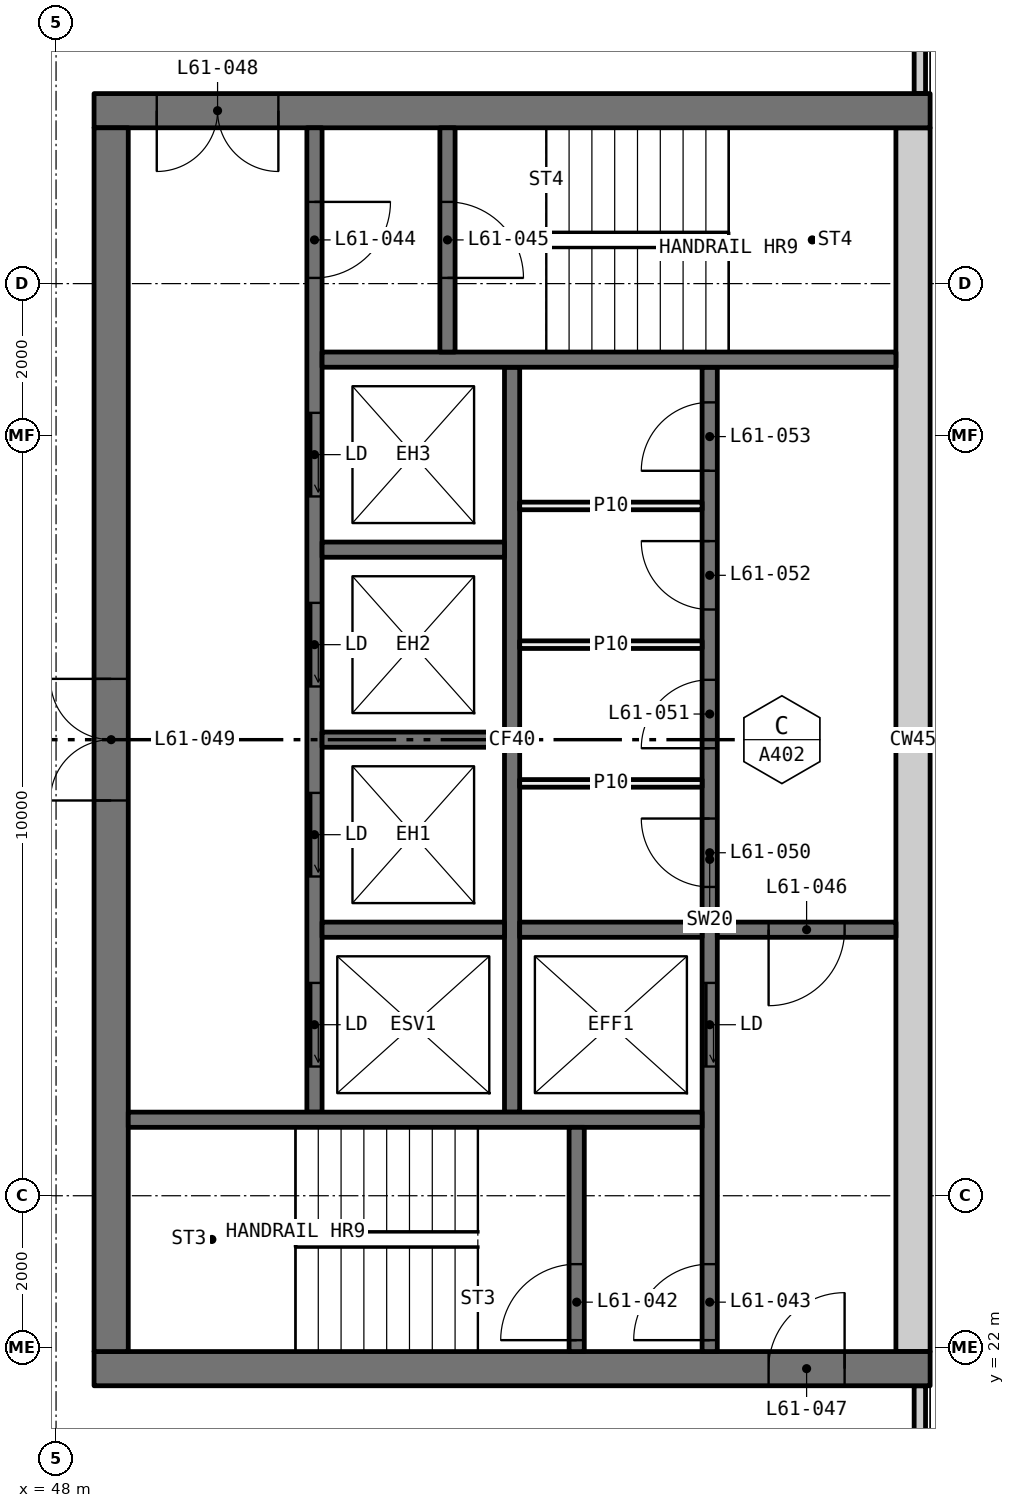
"""IFC4 building model, lengths in metres.
Left out: names, types, materials, properties, quantities, classifications, styles, units other than length and angle.
Written with IfcOpenShell. Run it as: python <this file> out.ifc"""

import sys

from ifc_helpers import new_model, si_unit, direction, frame, frame_2d, origin, place, context, subcontext, project, spatial, rectangle, extrude, element, fill, save


model = new_model("IFC4")
c1 = context("Model", 3, precision=1e-05, world=origin(), true_north=direction((0.0, 1.0)))
c2 = subcontext(c1, "Body", "Model", "MODEL_VIEW")
j1 = project(units=[si_unit("LENGTHUNIT", "METRE"), si_unit("PLANEANGLEUNIT", "RADIAN")], contexts=[c1])
p1 = place(None, origin())
s1 = spatial("IfcSite", under=j1, at=p1, CompositionType="ELEMENT")
p2 = place(p1, origin())
s2 = spatial("IfcBuilding", under=s1, at=p2, CompositionType="ELEMENT")
p3 = place(p2, frame((0.0, 0.0, 228.3)))
s3 = spatial("IfcBuildingStorey", under=s2, at=p3, CompositionType="ELEMENT", Elevation=228.3)
for number, where, z_axis, x_axis in (
    (1, (59.365, 18.71, 0.0), (0.0, 0.0, 1.0), (0.0, 1.0, 0.0)),
    (2, (59.365, 38.5, 0.0), (0.0, 0.0, 1.0), (0.0, 1.0, 0.0)),
):
    element("IfcWall", number, at=place(p3, frame(where, z_axis=z_axis, x_axis=x_axis)), inside=s3, PredefinedType="ELEMENTEDWALL", context=c2, shape_type="SweptSolid", body=[
        extrude(rectangle(XDim=2.79, YDim=0.15, at=frame_2d((1.395, 0.0))), origin(), (0.0, 0.0, 1.0), 3.05),
    ])
p4 = place(p3, frame((59.5, 21.725, 0.0), z_axis=(0.0, 0.0, 1.0), x_axis=(-1.0, 0.0, 0.0)))
e3 = element("IfcWall", 3, at=p4, inside=s3, PredefinedType="SHEAR", context=c2, shape_type="SweptSolid", body=[
    extrude(rectangle(XDim=11.0, YDim=0.45, at=frame_2d((5.5, 0.0))), origin(), (0.0, 0.0, 1.0), 3.05),
])
p5 = place(p4, frame((1.125, 0.0, 0.0)))
e4 = element("IfcOpeningElement", 4, at=p5, cuts=e3, PredefinedType="OPENING", context=c2, shape_type="SweptSolid", body=[
    extrude(rectangle(XDim=1.0, YDim=2.1, at=frame_2d((0.5, 1.05))), frame((0.0, 0.235, 0.0), z_axis=(0.0, -1.0, 0.0), x_axis=(1.0, 0.0, 0.0)), (0.0, 0.0, 1.0), 0.47),
])
p6 = place(p3, frame((59.5, 38.275, 0.0), z_axis=(0.0, 0.0, 1.0), x_axis=(-1.0, 0.0, 0.0)))
e5 = element("IfcWall", 5, at=p6, inside=s3, PredefinedType="SHEAR", context=c2, shape_type="SweptSolid", body=[
    extrude(rectangle(XDim=11.0, YDim=0.45, at=frame_2d((5.5, 0.0))), origin(), (0.0, 0.0, 1.0), 3.05),
])
p7 = place(p6, frame((8.575, 0.0, 0.0)))
e6 = element("IfcOpeningElement", 6, at=p7, cuts=e5, PredefinedType="OPENING", context=c2, shape_type="SweptSolid", body=[
    extrude(rectangle(XDim=1.6, YDim=2.1, at=frame_2d((0.8, 1.05))), frame((0.0, 0.235, 0.0), z_axis=(0.0, -1.0, 0.0), x_axis=(1.0, 0.0, 0.0)), (0.0, 0.0, 1.0), 0.47),
])
p8 = place(p3, frame((59.275, 21.95, 0.0), z_axis=(0.0, 0.0, 1.0), x_axis=(0.0, 1.0, 0.0)))
e7 = element("IfcWall", 7, at=p8, inside=s3, PredefinedType="SHEAR", context=c2, shape_type="SweptSolid", body=[
    extrude(rectangle(XDim=16.1, YDim=0.45, at=frame_2d((8.05, 0.0))), origin(), (0.0, 0.0, 1.0), 3.05),
])
p9 = place(p3, frame((48.725, 21.95, 0.0), z_axis=(0.0, 0.0, 1.0), x_axis=(0.0, 1.0, 0.0)))
e8 = element("IfcWall", 8, at=p9, inside=s3, PredefinedType="SHEAR", context=c2, shape_type="SweptSolid", body=[
    extrude(rectangle(XDim=16.1, YDim=0.45, at=frame_2d((8.05, 0.0))), origin(), (0.0, 0.0, 1.0), 3.05),
])
p10 = place(p9, frame((7.25, 0.0, 0.0)))
e9 = element("IfcOpeningElement", 9, at=p10, cuts=e8, PredefinedType="OPENING", context=c2, shape_type="SweptSolid", body=[
    extrude(rectangle(XDim=1.6, YDim=2.1, at=frame_2d((0.8, 1.05))), frame((0.0, 0.235, 0.0), z_axis=(0.0, -1.0, 0.0), x_axis=(1.0, 0.0, 0.0)), (0.0, 0.0, 1.0), 0.47),
])
p11 = place(p3, frame((56.6, 21.95, 0.0), z_axis=(0.0, 0.0, 1.0), x_axis=(0.0, 1.0, 0.0)))
e10 = element("IfcWall", 10, at=p11, inside=s3, PredefinedType="SOLIDWALL", context=c2, shape_type="SweptSolid", body=[
    extrude(rectangle(XDim=12.95, YDim=0.2, at=frame_2d((6.475, 0.0))), origin(), (0.0, 0.0, 1.0), 3.05),
])
p12 = place(p11, frame((3.75, 0.0, 0.0)))
e11 = element("IfcOpeningElement", 11, at=p12, cuts=e10, PredefinedType="OPENING", context=c2, shape_type="SweptSolid", body=[
    extrude(rectangle(XDim=1.1, YDim=2.1, at=frame_2d((0.55, 1.05))), frame((0.0, 0.11, 0.0), z_axis=(0.0, -1.0, 0.0), x_axis=(1.0, 0.0, 0.0)), (0.0, 0.0, 1.0), 0.22),
])
p13 = place(p11, frame((0.15, 0.0, 0.0)))
e12 = element("IfcOpeningElement", 12, at=p13, cuts=e10, PredefinedType="OPENING", context=c2, shape_type="SweptSolid", body=[
    extrude(rectangle(XDim=1.0, YDim=2.1, at=frame_2d((0.5, 1.05))), frame((0.0, 0.11, 0.0), z_axis=(0.0, -1.0, 0.0), x_axis=(1.0, 0.0, 0.0)), (0.0, 0.0, 1.0), 0.22),
])
p14 = place(p11, frame((6.113, 0.0, 0.0)))
e13 = element("IfcOpeningElement", 13, at=p14, cuts=e10, PredefinedType="OPENING", context=c2, shape_type="SweptSolid", body=[
    extrude(rectangle(XDim=0.9, YDim=2.1, at=frame_2d((0.45, 1.05))), frame((0.0, 0.11, 0.0), z_axis=(0.0, -1.0, 0.0), x_axis=(1.0, 0.0, 0.0)), (0.0, 0.0, 1.0), 0.22),
])
p15 = place(p11, frame((7.938, 0.0, 0.0)))
e14 = element("IfcOpeningElement", 14, at=p15, cuts=e10, PredefinedType="OPENING", context=c2, shape_type="SweptSolid", body=[
    extrude(rectangle(XDim=0.9, YDim=2.1, at=frame_2d((0.45, 1.05))), frame((0.0, 0.11, 0.0), z_axis=(0.0, -1.0, 0.0), x_axis=(1.0, 0.0, 0.0)), (0.0, 0.0, 1.0), 0.22),
])
p16 = place(p11, frame((9.762, 0.0, 0.0)))
e15 = element("IfcOpeningElement", 15, at=p16, cuts=e10, PredefinedType="OPENING", context=c2, shape_type="SweptSolid", body=[
    extrude(rectangle(XDim=0.9, YDim=2.1, at=frame_2d((0.45, 1.05))), frame((0.0, 0.11, 0.0), z_axis=(0.0, -1.0, 0.0), x_axis=(1.0, 0.0, 0.0)), (0.0, 0.0, 1.0), 0.22),
])
p17 = place(p11, frame((11.587, 0.0, 0.0)))
e16 = element("IfcOpeningElement", 16, at=p17, cuts=e10, PredefinedType="OPENING", context=c2, shape_type="SweptSolid", body=[
    extrude(rectangle(XDim=0.9, YDim=2.1, at=frame_2d((0.45, 1.05))), frame((0.0, 0.11, 0.0), z_axis=(0.0, -1.0, 0.0), x_axis=(1.0, 0.0, 0.0)), (0.0, 0.0, 1.0), 0.22),
])
p18 = place(p3, frame((51.4, 25.1, 0.0), z_axis=(0.0, 0.0, 1.0), x_axis=(0.0, 1.0, 0.0)))
e17 = element("IfcWall", 17, at=p18, inside=s3, PredefinedType="SOLIDWALL", context=c2, shape_type="SweptSolid", body=[
    extrude(rectangle(XDim=12.95, YDim=0.2, at=frame_2d((6.475, 0.0))), origin(), (0.0, 0.0, 1.0), 3.05),
])
p19 = place(p18, frame((0.6, 0.0, 0.0)))
e18 = element("IfcOpeningElement", 18, at=p19, cuts=e17, PredefinedType="OPENING", context=c2, shape_type="SweptSolid", body=[
    extrude(rectangle(XDim=1.1, YDim=2.1, at=frame_2d((0.55, 1.05))), frame((0.0, 0.11, 0.0), z_axis=(0.0, -1.0, 0.0), x_axis=(1.0, 0.0, 0.0)), (0.0, 0.0, 1.0), 0.22),
])
p20 = place(p18, frame((3.1, 0.0, 0.0)))
e19 = element("IfcOpeningElement", 19, at=p20, cuts=e17, PredefinedType="OPENING", context=c2, shape_type="SweptSolid", body=[
    extrude(rectangle(XDim=1.1, YDim=2.1, at=frame_2d((0.55, 1.05))), frame((0.0, 0.11, 0.0), z_axis=(0.0, -1.0, 0.0), x_axis=(1.0, 0.0, 0.0)), (0.0, 0.0, 1.0), 0.22),
])
p21 = place(p18, frame((5.6, 0.0, 0.0)))
e20 = element("IfcOpeningElement", 20, at=p21, cuts=e17, PredefinedType="OPENING", context=c2, shape_type="SweptSolid", body=[
    extrude(rectangle(XDim=1.1, YDim=2.1, at=frame_2d((0.55, 1.05))), frame((0.0, 0.11, 0.0), z_axis=(0.0, -1.0, 0.0), x_axis=(1.0, 0.0, 0.0)), (0.0, 0.0, 1.0), 0.22),
])
p22 = place(p18, frame((8.1, 0.0, 0.0)))
e21 = element("IfcOpeningElement", 21, at=p22, cuts=e17, PredefinedType="OPENING", context=c2, shape_type="SweptSolid", body=[
    extrude(rectangle(XDim=1.1, YDim=2.1, at=frame_2d((0.55, 1.05))), frame((0.0, 0.11, 0.0), z_axis=(0.0, -1.0, 0.0), x_axis=(1.0, 0.0, 0.0)), (0.0, 0.0, 1.0), 0.22),
])
p23 = place(p18, frame((10.975, 0.0, 0.0)))
e22 = element("IfcOpeningElement", 22, at=p23, cuts=e17, PredefinedType="OPENING", context=c2, shape_type="SweptSolid", body=[
    extrude(rectangle(XDim=1.0, YDim=2.1, at=frame_2d((0.5, 1.05))), frame((0.0, 0.11, 0.0), z_axis=(0.0, -1.0, 0.0), x_axis=(1.0, 0.0, 0.0)), (0.0, 0.0, 1.0), 0.22),
])
p24 = place(p3, frame((54.0, 25.1, 0.0), z_axis=(0.0, 0.0, 1.0), x_axis=(0.0, 1.0, 0.0)))
e23 = element("IfcWall", 23, at=p24, inside=s3, PredefinedType="SOLIDWALL", context=c2, shape_type="SweptSolid", body=[
    extrude(rectangle(XDim=9.8, YDim=0.2, at=frame_2d((4.9, 0.0))), origin(), (0.0, 0.0, 1.0), 3.05),
])
for number, where, z_axis, x_axis in (
    (24, (56.5, 25.0, 0.0), (0.0, 0.0, 1.0), (-1.0, 0.0, 0.0)),
    (25, (59.05, 35.0, 0.0), (0.0, 0.0, 1.0), (-1.0, 0.0, 0.0)),
):
    element("IfcWall", number, at=place(p3, frame(where, z_axis=z_axis, x_axis=x_axis)), inside=s3, PredefinedType="SOLIDWALL", context=c2, shape_type="SweptSolid", body=[
        extrude(rectangle(XDim=7.55, YDim=0.2, at=frame_2d((3.775, 0.0))), origin(), (0.0, 0.0, 1.0), 3.05),
    ])
p25 = place(p3, frame((59.05, 27.5, 0.0), z_axis=(0.0, 0.0, 1.0), x_axis=(-1.0, 0.0, 0.0)))
e26 = element("IfcWall", 26, at=p25, inside=s3, PredefinedType="SOLIDWALL", context=c2, shape_type="SweptSolid", body=[
    extrude(rectangle(XDim=2.35, YDim=0.2, at=frame_2d((1.175, 0.0))), origin(), (0.0, 0.0, 1.0), 3.05),
])
p26 = place(p25, frame((0.675, 0.0, 0.0)))
e27 = element("IfcOpeningElement", 27, at=p26, cuts=e26, PredefinedType="OPENING", context=c2, shape_type="SweptSolid", body=[
    extrude(rectangle(XDim=1.0, YDim=2.1, at=frame_2d((0.5, 1.05))), frame((0.0, 0.11, 0.0), z_axis=(0.0, -1.0, 0.0), x_axis=(1.0, 0.0, 0.0)), (0.0, 0.0, 1.0), 0.22),
])
p27 = place(p3, frame((54.85, 21.95, 0.0), z_axis=(0.0, 0.0, 1.0), x_axis=(0.0, 1.0, 0.0)))
e28 = element("IfcWall", 28, at=p27, inside=s3, PredefinedType="SOLIDWALL", context=c2, shape_type="SweptSolid", body=[
    extrude(rectangle(XDim=2.95, YDim=0.2, at=frame_2d((1.475, 0.0))), origin(), (0.0, 0.0, 1.0), 3.05),
])
p28 = place(p27, frame((0.15, 0.0, 0.0)))
e29 = element("IfcOpeningElement", 29, at=p28, cuts=e28, PredefinedType="OPENING", context=c2, shape_type="SweptSolid", body=[
    extrude(rectangle(XDim=1.0, YDim=2.1, at=frame_2d((0.5, 1.05))), frame((0.0, 0.11, 0.0), z_axis=(0.0, -1.0, 0.0), x_axis=(1.0, 0.0, 0.0)), (0.0, 0.0, 1.0), 0.22),
])
p29 = place(p3, frame((53.15, 35.1, 0.0), z_axis=(0.0, 0.0, 1.0), x_axis=(0.0, 1.0, 0.0)))
e30 = element("IfcWall", 30, at=p29, inside=s3, PredefinedType="SOLIDWALL", context=c2, shape_type="SweptSolid", body=[
    extrude(rectangle(XDim=2.95, YDim=0.2, at=frame_2d((1.475, 0.0))), origin(), (0.0, 0.0, 1.0), 3.05),
])
p30 = place(p29, frame((0.975, 0.0, 0.0)))
e31 = element("IfcOpeningElement", 31, at=p30, cuts=e30, PredefinedType="OPENING", context=c2, shape_type="SweptSolid", body=[
    extrude(rectangle(XDim=1.0, YDim=2.1, at=frame_2d((0.5, 1.05))), frame((0.0, 0.11, 0.0), z_axis=(0.0, -1.0, 0.0), x_axis=(1.0, 0.0, 0.0)), (0.0, 0.0, 1.0), 0.22),
])
for number, where, z_axis, x_axis in (
    (32, (56.5, 27.5, 0.0), (0.0, 0.0, 1.0), (-1.0, 0.0, 0.0)),
    (33, (53.9, 27.5, 0.0), (0.0, 0.0, 1.0), (-1.0, 0.0, 0.0)),
    (34, (53.9, 30.0, 0.0), (0.0, 0.0, 1.0), (-1.0, 0.0, 0.0)),
    (35, (53.9, 32.5, 0.0), (0.0, 0.0, 1.0), (-1.0, 0.0, 0.0)),
):
    element("IfcWall", number, at=place(p3, frame(where, z_axis=z_axis, x_axis=x_axis)), inside=s3, PredefinedType="SOLIDWALL", context=c2, shape_type="SweptSolid", body=[
        extrude(rectangle(XDim=2.4, YDim=0.2, at=frame_2d((1.2, 0.0))), origin(), (0.0, 0.0, 1.0), 3.05),
    ])
for number, where, z_axis, x_axis in (
    (36, (56.5, 29.425, 0.0), (0.0, 0.0, 1.0), (-1.0, 0.0, 0.0)),
    (37, (56.5, 31.25, 0.0), (0.0, 0.0, 1.0), (-1.0, 0.0, 0.0)),
    (38, (56.5, 33.075, 0.0), (0.0, 0.0, 1.0), (-1.0, 0.0, 0.0)),
):
    element("IfcWall", number, at=place(p3, frame(where, z_axis=z_axis, x_axis=x_axis)), inside=s3, PredefinedType="PARTITIONING", context=c2, shape_type="SweptSolid", body=[
        extrude(rectangle(XDim=2.4, YDim=0.1, at=frame_2d((1.2, 0.0))), origin(), (0.0, 0.0, 1.0), 3.05),
    ])
p31 = place(p19, origin())
e39 = element("IfcDoor", 39, at=p31, inside=s3, OperationType="SLIDING_TO_LEFT", PredefinedType="DOOR", context=c2, shape_type="SweptSolid", body=[
    extrude(rectangle(XDim=1.1, YDim=2.1, at=frame_2d((0.55, 1.05))), frame((0.0, 0.025, 0.0), z_axis=(0.0, -1.0, 0.0), x_axis=(1.0, 0.0, 0.0)), (0.0, 0.0, 1.0), 0.05),
])
fill(e18, e39)
p32 = place(p20, origin())
e40 = element("IfcDoor", 40, at=p32, inside=s3, OperationType="SLIDING_TO_LEFT", PredefinedType="DOOR", context=c2, shape_type="SweptSolid", body=[
    extrude(rectangle(XDim=1.1, YDim=2.1, at=frame_2d((0.55, 1.05))), frame((0.0, 0.025, 0.0), z_axis=(0.0, -1.0, 0.0), x_axis=(1.0, 0.0, 0.0)), (0.0, 0.0, 1.0), 0.05),
])
fill(e19, e40)
p33 = place(p21, origin())
e41 = element("IfcDoor", 41, at=p33, inside=s3, OperationType="SLIDING_TO_LEFT", PredefinedType="DOOR", context=c2, shape_type="SweptSolid", body=[
    extrude(rectangle(XDim=1.1, YDim=2.1, at=frame_2d((0.55, 1.05))), frame((0.0, 0.025, 0.0), z_axis=(0.0, -1.0, 0.0), x_axis=(1.0, 0.0, 0.0)), (0.0, 0.0, 1.0), 0.05),
])
fill(e20, e41)
p34 = place(p22, origin())
e42 = element("IfcDoor", 42, at=p34, inside=s3, OperationType="SLIDING_TO_LEFT", PredefinedType="DOOR", context=c2, shape_type="SweptSolid", body=[
    extrude(rectangle(XDim=1.1, YDim=2.1, at=frame_2d((0.55, 1.05))), frame((0.0, 0.025, 0.0), z_axis=(0.0, -1.0, 0.0), x_axis=(1.0, 0.0, 0.0)), (0.0, 0.0, 1.0), 0.05),
])
fill(e21, e42)
p35 = place(p12, origin())
e43 = element("IfcDoor", 43, at=p35, inside=s3, OperationType="SLIDING_TO_LEFT", PredefinedType="DOOR", context=c2, shape_type="SweptSolid", body=[
    extrude(rectangle(XDim=1.1, YDim=2.1, at=frame_2d((0.55, 1.05))), frame((0.0, 0.025, 0.0), z_axis=(0.0, -1.0, 0.0), x_axis=(1.0, 0.0, 0.0)), (0.0, 0.0, 1.0), 0.05),
])
fill(e11, e43)
p36 = place(p28, origin())
e44 = element("IfcDoor", 44, at=p36, inside=s3, OperationType="SINGLE_SWING_RIGHT", PredefinedType="DOOR", context=c2, shape_type="SweptSolid", body=[
    extrude(rectangle(XDim=1.0, YDim=2.1, at=frame_2d((0.5, 1.05))), frame((0.0, 0.025, 0.0), z_axis=(0.0, -1.0, 0.0), x_axis=(1.0, 0.0, 0.0)), (0.0, 0.0, 1.0), 0.05),
])
fill(e29, e44)
p37 = place(p13, origin())
e45 = element("IfcDoor", 45, at=p37, inside=s3, OperationType="SINGLE_SWING_RIGHT", PredefinedType="DOOR", context=c2, shape_type="SweptSolid", body=[
    extrude(rectangle(XDim=1.0, YDim=2.1, at=frame_2d((0.5, 1.05))), frame((0.0, 0.025, 0.0), z_axis=(0.0, -1.0, 0.0), x_axis=(1.0, 0.0, 0.0)), (0.0, 0.0, 1.0), 0.05),
])
fill(e12, e45)
p38 = place(p23, frame((1.0, 0.0, 0.0), x_axis=(-1.0, 0.0, 0.0)))
e46 = element("IfcDoor", 46, at=p38, inside=s3, OperationType="SINGLE_SWING_RIGHT", PredefinedType="DOOR", context=c2, shape_type="SweptSolid", body=[
    extrude(rectangle(XDim=1.0, YDim=2.1, at=frame_2d((0.5, 1.05))), frame((0.0, 0.025, 0.0), z_axis=(0.0, -1.0, 0.0), x_axis=(1.0, 0.0, 0.0)), (0.0, 0.0, 1.0), 0.05),
])
fill(e22, e46)
p39 = place(p30, frame((1.0, 0.0, 0.0), x_axis=(-1.0, 0.0, 0.0)))
e47 = element("IfcDoor", 47, at=p39, inside=s3, OperationType="SINGLE_SWING_LEFT", PredefinedType="DOOR", context=c2, shape_type="SweptSolid", body=[
    extrude(rectangle(XDim=1.0, YDim=2.1, at=frame_2d((0.5, 1.05))), frame((0.0, 0.025, 0.0), z_axis=(0.0, -1.0, 0.0), x_axis=(1.0, 0.0, 0.0)), (0.0, 0.0, 1.0), 0.05),
])
fill(e31, e47)
p40 = place(p26, origin())
e48 = element("IfcDoor", 48, at=p40, inside=s3, OperationType="SINGLE_SWING_LEFT", PredefinedType="DOOR", context=c2, shape_type="SweptSolid", body=[
    extrude(rectangle(XDim=1.0, YDim=2.1, at=frame_2d((0.5, 1.05))), frame((0.0, 0.025, 0.0), z_axis=(0.0, -1.0, 0.0), x_axis=(1.0, 0.0, 0.0)), (0.0, 0.0, 1.0), 0.05),
])
fill(e27, e48)
p41 = place(p5, frame((1.0, 0.0, 0.0), x_axis=(-1.0, 0.0, 0.0)))
e49 = element("IfcDoor", 49, at=p41, inside=s3, OperationType="SINGLE_SWING_LEFT", PredefinedType="DOOR", context=c2, shape_type="SweptSolid", body=[
    extrude(rectangle(XDim=1.0, YDim=2.1, at=frame_2d((0.5, 1.05))), frame((0.0, 0.025, 0.0), z_axis=(0.0, -1.0, 0.0), x_axis=(1.0, 0.0, 0.0)), (0.0, 0.0, 1.0), 0.05),
])
fill(e4, e49)
p42 = place(p7, origin())
e50 = element("IfcDoor", 50, at=p42, inside=s3, OperationType="DOUBLE_DOOR_SINGLE_SWING", PredefinedType="DOOR", context=c2, shape_type="SweptSolid", body=[
    extrude(rectangle(XDim=1.6, YDim=2.1, at=frame_2d((0.8, 1.05))), frame((0.0, 0.025, 0.0), z_axis=(0.0, -1.0, 0.0), x_axis=(1.0, 0.0, 0.0)), (0.0, 0.0, 1.0), 0.05),
])
fill(e6, e50)
p43 = place(p10, origin())
e51 = element("IfcDoor", 51, at=p43, inside=s3, OperationType="DOUBLE_DOOR_SINGLE_SWING", PredefinedType="DOOR", context=c2, shape_type="SweptSolid", body=[
    extrude(rectangle(XDim=1.6, YDim=2.1, at=frame_2d((0.8, 1.05))), frame((0.0, 0.025, 0.0), z_axis=(0.0, -1.0, 0.0), x_axis=(1.0, 0.0, 0.0)), (0.0, 0.0, 1.0), 0.05),
])
fill(e9, e51)
p44 = place(p14, origin())
e52 = element("IfcDoor", 52, at=p44, inside=s3, OperationType="SINGLE_SWING_LEFT", PredefinedType="DOOR", context=c2, shape_type="SweptSolid", body=[
    extrude(rectangle(XDim=0.9, YDim=2.1, at=frame_2d((0.45, 1.05))), frame((0.0, 0.025, 0.0), z_axis=(0.0, -1.0, 0.0), x_axis=(1.0, 0.0, 0.0)), (0.0, 0.0, 1.0), 0.05),
])
fill(e13, e52)
p45 = place(p15, origin())
e53 = element("IfcDoor", 53, at=p45, inside=s3, OperationType="SINGLE_SWING_RIGHT", PredefinedType="DOOR", context=c2, shape_type="SweptSolid", body=[
    extrude(rectangle(XDim=0.9, YDim=2.1, at=frame_2d((0.45, 1.05))), frame((0.0, 0.025, 0.0), z_axis=(0.0, -1.0, 0.0), x_axis=(1.0, 0.0, 0.0)), (0.0, 0.0, 1.0), 0.05),
])
fill(e14, e53)
p46 = place(p16, origin())
e54 = element("IfcDoor", 54, at=p46, inside=s3, OperationType="SINGLE_SWING_LEFT", PredefinedType="DOOR", context=c2, shape_type="SweptSolid", body=[
    extrude(rectangle(XDim=0.9, YDim=2.1, at=frame_2d((0.45, 1.05))), frame((0.0, 0.025, 0.0), z_axis=(0.0, -1.0, 0.0), x_axis=(1.0, 0.0, 0.0)), (0.0, 0.0, 1.0), 0.05),
])
fill(e15, e54)
p47 = place(p17, origin())
e55 = element("IfcDoor", 55, at=p47, inside=s3, OperationType="SINGLE_SWING_RIGHT", PredefinedType="DOOR", context=c2, shape_type="SweptSolid", body=[
    extrude(rectangle(XDim=0.9, YDim=2.1, at=frame_2d((0.45, 1.05))), frame((0.0, 0.025, 0.0), z_axis=(0.0, -1.0, 0.0), x_axis=(1.0, 0.0, 0.0)), (0.0, 0.0, 1.0), 0.05),
])
fill(e16, e55)
save(model, sys.argv[1])
